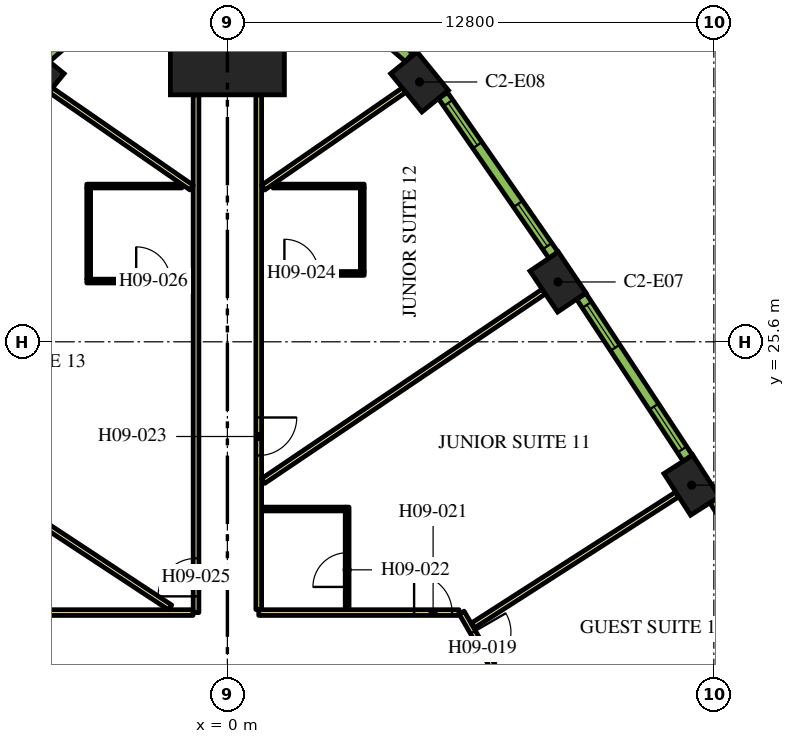
"""IFC4 building model, lengths in metres.
Left out: names, types, materials, properties, quantities, classifications, styles, units other than length and angle.
Written with IfcOpenShell. Run it as: python <this file> out.ifc"""

import sys

from ifc_helpers import new_model, si_unit, direction, frame, frame_2d, origin, origin_2d, place, context, subcontext, project, spatial, rectangle, extrude, element, fill, save


model = new_model("IFC4")
c1 = context("Model", 3, precision=1e-05, world=origin(), true_north=direction((0.0, 1.0)))
c2 = subcontext(c1, "Body", "Model", "MODEL_VIEW")
j1 = project(units=[si_unit("LENGTHUNIT", "METRE"), si_unit("PLANEANGLEUNIT", "RADIAN")], contexts=[c1])
p1 = place(None, origin())
s1 = spatial("IfcSite", under=j1, at=p1, CompositionType="ELEMENT")
p2 = place(p1, origin())
s2 = spatial("IfcBuilding", under=s1, at=p2, CompositionType="ELEMENT")
p3 = place(p2, frame((0.0, 0.0, 126.6)))
s3 = spatial("IfcBuildingStorey", under=s2, at=p3, CompositionType="ELEMENT", Elevation=126.6)
p4 = place(p3, frame((0.0, 33.598, 0.0), z_axis=(0.0, 0.0, 1.0), x_axis=(0.0, 1.0, 0.0)))
e1 = element("IfcColumn", 1, at=p4, inside=s3, PredefinedType="COLUMN", context=c2, shape_type="SweptSolid", body=[
    extrude(rectangle(XDim=3.0, YDim=3.0, at=origin_2d()), origin(), (0.0, 0.0, 1.0), 3.9),
])
for number, where, z_axis, x_axis in (
    (2, (12.217, 21.828, 0.0), (0.0, 0.0, 1.0), (-0.54, 0.842, 0.0)),
    (3, (8.699, 27.174, 0.0), (0.0, 0.0, 1.0), (-0.559, 0.829, 0.0)),
    (4, (5.056, 32.437, 0.0), (0.0, 0.0, 1.0), (-0.632, 0.775, 0.0)),
    (5, (-5.056, 32.437, 0.0), (0.0, 0.0, 1.0), (-0.632, -0.775, 0.0)),
):
    element("IfcColumn", number, at=place(p3, frame(where, z_axis=z_axis, x_axis=x_axis)), inside=s3, PredefinedType="COLUMN", context=c2, shape_type="SweptSolid", body=[
        extrude(rectangle(XDim=1.3, YDim=0.9, at=origin_2d()), origin(), (0.0, 0.0, 1.0), 3.9),
    ])
p5 = place(p3, frame((6.163, 18.475, 0.0), z_axis=(0.0, 0.0, 1.0), x_axis=(0.500001317485, -0.866024643133, 0.0)))
e6 = element("IfcWall", 6, at=p5, inside=s3, PredefinedType="PARTITIONING", context=c2, shape_type="SweptSolid", body=[
    extrude(rectangle(XDim=25.767, YDim=0.15, at=frame_2d((12.883, 0.0))), origin(), (0.0, 0.0, 1.0), 2.75),
])
p6 = place(p5, frame((19.306, 0.0, 0.0)))
e7 = element("IfcOpeningElement", 7, at=p6, cuts=e6, PredefinedType="OPENING", context=c2, shape_type="SweptSolid", body=[
    extrude(rectangle(XDim=1.0, YDim=2.1, at=frame_2d((0.5, 1.05))), frame((0.0, 0.085, 0.0), z_axis=(0.0, -1.0, 0.0), x_axis=(1.0, 0.0, 0.0)), (0.0, 0.0, 1.0), 0.17),
])
p7 = place(p5, frame((17.999, 0.0, 0.0)))
e8 = element("IfcOpeningElement", 8, at=p7, cuts=e6, PredefinedType="OPENING", context=c2, shape_type="SweptSolid", body=[
    extrude(rectangle(XDim=1.0, YDim=2.1, at=frame_2d((0.5, 1.05))), frame((0.0, 0.085, 0.0), z_axis=(0.0, -1.0, 0.0), x_axis=(1.0, 0.0, 0.0)), (0.0, 0.0, 1.0), 0.17),
])
p8 = place(p5, frame((0.596, 0.0, 0.0)))
e9 = element("IfcOpeningElement", 9, at=p8, cuts=e6, PredefinedType="OPENING", context=c2, shape_type="SweptSolid", body=[
    extrude(rectangle(XDim=1.0, YDim=2.1, at=frame_2d((0.5, 1.05))), frame((0.0, 0.085, 0.0), z_axis=(0.0, -1.0, 0.0), x_axis=(1.0, 0.0, 0.0)), (0.0, 0.0, 1.0), 0.17),
])
p9 = place(p3, frame((0.825, 18.475, 0.0), z_axis=(0.0, 0.0, 1.0), x_axis=(1.0, 0.0, 0.0)))
e10 = element("IfcWall", 10, at=p9, inside=s3, PredefinedType="PARTITIONING", context=c2, shape_type="SweptSolid", body=[
    extrude(rectangle(XDim=5.268, YDim=0.15, at=frame_2d((2.634, 0.0))), origin(), (0.0, 0.0, 1.0), 2.75),
])
p10 = place(p9, frame((4.088, 0.0, 0.0)))
e11 = element("IfcOpeningElement", 11, at=p10, cuts=e10, PredefinedType="OPENING", context=c2, shape_type="SweptSolid", body=[
    extrude(rectangle(XDim=1.0, YDim=2.1, at=frame_2d((0.5, 1.05))), frame((0.0, 0.085, 0.0), z_axis=(0.0, -1.0, 0.0), x_axis=(1.0, 0.0, 0.0)), (0.0, 0.0, 1.0), 0.17),
])
p11 = place(p3, frame((0.825, 32.098, 0.0), z_axis=(0.0, 0.0, 1.0), x_axis=(0.0, -1.0, 0.0)))
e12 = element("IfcWall", 12, at=p11, inside=s3, PredefinedType="PARTITIONING", context=c2, shape_type="SweptSolid", body=[
    extrude(rectangle(XDim=13.543, YDim=0.15, at=frame_2d((6.772, 0.0))), origin(), (0.0, 0.0, 1.0), 2.75),
])
p12 = place(p11, frame((8.49, 0.0, 0.0)))
e13 = element("IfcOpeningElement", 13, at=p12, cuts=e12, PredefinedType="OPENING", context=c2, shape_type="SweptSolid", body=[
    extrude(rectangle(XDim=1.0, YDim=2.1, at=frame_2d((0.5, 1.05))), frame((0.0, 0.085, 0.0), z_axis=(0.0, -1.0, 0.0), x_axis=(1.0, 0.0, 0.0)), (0.0, 0.0, 1.0), 0.17),
])
p13 = place(p3, frame((-0.825, 18.475, 0.0), z_axis=(0.0, 0.0, 1.0), x_axis=(0.0, 1.0, 0.0)))
e14 = element("IfcWall", 14, at=p13, inside=s3, PredefinedType="PARTITIONING", context=c2, shape_type="SweptSolid", body=[
    extrude(rectangle(XDim=13.623, YDim=0.15, at=frame_2d((6.812, 0.0))), origin(), (0.0, 0.0, 1.0), 2.75),
])
p14 = place(p13, frame((0.427, 0.0, 0.0)))
e15 = element("IfcOpeningElement", 15, at=p14, cuts=e14, PredefinedType="OPENING", context=c2, shape_type="SweptSolid", body=[
    extrude(rectangle(XDim=1.0, YDim=2.1, at=frame_2d((0.5, 1.05))), frame((0.0, 0.085, 0.0), z_axis=(0.0, -1.0, 0.0), x_axis=(1.0, 0.0, 0.0)), (0.0, 0.0, 1.0), 0.17),
])
p15 = place(p3, frame((-6.163, 18.475, 0.0), z_axis=(0.0, 0.0, 1.0), x_axis=(1.0, 0.0, 0.0)))
e16 = element("IfcWall", 16, at=p15, inside=s3, PredefinedType="PARTITIONING", context=c2, shape_type="SweptSolid", body=[
    extrude(rectangle(XDim=5.258, YDim=0.15, at=frame_2d((2.629, 0.0))), origin(), (0.0, 0.0, 1.0), 2.75),
])
p16 = place(p3, frame((-10.592, 24.589, 0.0), z_axis=(0.0, 0.0, 1.0), x_axis=(0.835337323748, -0.549737715236, 0.0)))
e17 = element("IfcWall", 17, at=p16, inside=s3, PredefinedType="PARTITIONING", context=c2, shape_type="SweptSolid", body=[
    extrude(rectangle(XDim=10.875, YDim=0.15, at=frame_2d((5.438, 0.0))), origin(), (0.0, 0.0, 1.0), 2.75),
])
p17 = place(p3, frame((-4.649, 32.223, 0.0), z_axis=(0.0, 0.0, 1.0), x_axis=(0.822262349475, -0.569108626394, 0.0)))
e18 = element("IfcWall", 18, at=p17, inside=s3, PredefinedType="PARTITIONING", context=c2, shape_type="SweptSolid", body=[
    extrude(rectangle(XDim=4.51, YDim=0.15, at=frame_2d((2.255, 0.0))), origin(), (0.0, 0.0, 1.0), 2.75),
])
p18 = place(p3, frame((8.326, 26.923, 0.0), z_axis=(0.0, 0.0, 1.0), x_axis=(-0.828836601893, -0.5594907393, 0.0)))
e19 = element("IfcWall", 19, at=p18, inside=s3, PredefinedType="PARTITIONING", context=c2, shape_type="SweptSolid", body=[
    extrude(rectangle(XDim=8.909, YDim=0.15, at=frame_2d((4.455, 0.0))), origin(), (0.0, 0.0, 1.0), 2.75),
])
p19 = place(p3, frame((4.649, 32.223, 0.0), z_axis=(0.0, 0.0, 1.0), x_axis=(-0.822262349475, -0.569108626394, 0.0)))
e20 = element("IfcWall", 20, at=p19, inside=s3, PredefinedType="PARTITIONING", context=c2, shape_type="SweptSolid", body=[
    extrude(rectangle(XDim=4.51, YDim=0.15, at=frame_2d((2.255, 0.0))), origin(), (0.0, 0.0, 1.0), 2.75),
])
p20 = place(p3, frame((11.838, 21.585, 0.0), z_axis=(0.0, 0.0, 1.0), x_axis=(-0.841699322813, -0.539946525108, 0.0)))
e21 = element("IfcWall", 21, at=p20, inside=s3, PredefinedType="PARTITIONING", context=c2, shape_type="SweptSolid", body=[
    extrude(rectangle(XDim=6.392, YDim=0.15, at=frame_2d((3.196, 0.0))), origin(), (0.0, 0.0, 1.0), 2.75),
])
p21 = place(p3, frame((3.151, 18.55, 0.0), z_axis=(0.0, 0.0, 1.0), x_axis=(0.0, 1.0, 0.0)))
e22 = element("IfcWall", 22, at=p21, inside=s3, PredefinedType="PARTITIONING", context=c2, shape_type="SweptSolid", body=[
    extrude(rectangle(XDim=2.7, YDim=0.1, at=frame_2d((1.35, 0.0))), origin(), (0.0, 0.0, 1.0), 2.75),
])
p22 = place(p21, frame((0.6, 0.0, 0.0)))
e23 = element("IfcOpeningElement", 23, at=p22, cuts=e22, PredefinedType="OPENING", context=c2, shape_type="SweptSolid", body=[
    extrude(rectangle(XDim=0.9, YDim=2.1, at=frame_2d((0.45, 1.05))), frame((0.0, 0.06, 0.0), z_axis=(0.0, -1.0, 0.0), x_axis=(1.0, 0.0, 0.0)), (0.0, 0.0, 1.0), 0.12),
])
p23 = place(p3, frame((3.101, 21.2, 0.0), z_axis=(0.0, 0.0, 1.0), x_axis=(-1.0, 0.0, 0.0)))
e24 = element("IfcWall", 24, at=p23, inside=s3, PredefinedType="PARTITIONING", context=c2, shape_type="SweptSolid", body=[
    extrude(rectangle(XDim=2.2, YDim=0.1, at=frame_2d((1.1, 0.0))), origin(), (0.0, 0.0, 1.0), 2.75),
])
p24 = place(p3, frame((0.9, 27.398, 0.0), z_axis=(0.0, 0.0, 1.0), x_axis=(1.0, 0.0, 0.0)))
e25 = element("IfcWall", 25, at=p24, inside=s3, PredefinedType="PARTITIONING", context=c2, shape_type="SweptSolid", body=[
    extrude(rectangle(XDim=2.7, YDim=0.1, at=frame_2d((1.35, 0.0))), origin(), (0.0, 0.0, 1.0), 2.75),
])
p25 = place(p24, frame((0.6, 0.0, 0.0)))
e26 = element("IfcOpeningElement", 26, at=p25, cuts=e25, PredefinedType="OPENING", context=c2, shape_type="SweptSolid", body=[
    extrude(rectangle(XDim=0.9, YDim=2.1, at=frame_2d((0.45, 1.05))), frame((0.0, 0.06, 0.0), z_axis=(0.0, -1.0, 0.0), x_axis=(1.0, 0.0, 0.0)), (0.0, 0.0, 1.0), 0.12),
])
p26 = place(p3, frame((3.55, 27.448, 0.0), z_axis=(0.0, 0.0, 1.0), x_axis=(0.0, 1.0, 0.0)))
e27 = element("IfcWall", 27, at=p26, inside=s3, PredefinedType="PARTITIONING", context=c2, shape_type="SweptSolid", body=[
    extrude(rectangle(XDim=2.2, YDim=0.1, at=frame_2d((1.1, 0.0))), origin(), (0.0, 0.0, 1.0), 2.75),
])
p27 = place(p3, frame((1.2, 29.698, 0.0), z_axis=(0.0, 0.0, 1.0), x_axis=(1.0, 0.0, 0.0)))
e28 = element("IfcWall", 28, at=p27, inside=s3, PredefinedType="PARTITIONING", context=c2, shape_type="SweptSolid", body=[
    extrude(rectangle(XDim=2.4, YDim=0.1, at=frame_2d((1.2, 0.0))), origin(), (0.0, 0.0, 1.0), 2.75),
])
p28 = place(p3, frame((-3.7, 27.198, 0.0), z_axis=(0.0, 0.0, 1.0), x_axis=(1.0, 0.0, 0.0)))
e29 = element("IfcWall", 29, at=p28, inside=s3, PredefinedType="PARTITIONING", context=c2, shape_type="SweptSolid", body=[
    extrude(rectangle(XDim=2.8, YDim=0.1, at=frame_2d((1.4, 0.0))), origin(), (0.0, 0.0, 1.0), 2.75),
])
p29 = place(p28, frame((1.3, 0.0, 0.0)))
e30 = element("IfcOpeningElement", 30, at=p29, cuts=e29, PredefinedType="OPENING", context=c2, shape_type="SweptSolid", body=[
    extrude(rectangle(XDim=0.9, YDim=2.1, at=frame_2d((0.45, 1.05))), frame((0.0, 0.06, 0.0), z_axis=(0.0, -1.0, 0.0), x_axis=(1.0, 0.0, 0.0)), (0.0, 0.0, 1.0), 0.12),
])
p30 = place(p3, frame((-3.65, 27.248, 0.0), z_axis=(0.0, 0.0, 1.0), x_axis=(0.0, 1.0, 0.0)))
e31 = element("IfcWall", 31, at=p30, inside=s3, PredefinedType="PARTITIONING", context=c2, shape_type="SweptSolid", body=[
    extrude(rectangle(XDim=2.4, YDim=0.1, at=frame_2d((1.2, 0.0))), origin(), (0.0, 0.0, 1.0), 2.75),
])
p31 = place(p3, frame((-1.2, 29.698, 0.0), z_axis=(0.0, 0.0, 1.0), x_axis=(-1.0, 0.0, 0.0)))
e32 = element("IfcWall", 32, at=p31, inside=s3, PredefinedType="PARTITIONING", context=c2, shape_type="SweptSolid", body=[
    extrude(rectangle(XDim=2.5, YDim=0.1, at=frame_2d((1.25, 0.0))), origin(), (0.0, 0.0, 1.0), 2.75),
])
p32 = place(p3, frame((15.524, 17.114, 0.0), z_axis=(0.0, 0.0, 1.0), x_axis=(-0.530072082134, 0.847952585787, 0.0)))
e33 = element("IfcWall", 33, at=p32, inside=s3, PredefinedType="SOLIDWALL", context=c2, shape_type="SweptSolid", body=[
    extrude(rectangle(XDim=5.1, YDim=0.29, at=frame_2d((2.55, 0.0))), origin(), (0.0, 0.0, 1.0), 3.65),
])
p33 = place(p32, frame((0.273, 0.0, 0.9)))
e34 = element("IfcOpeningElement", 34, at=p33, cuts=e33, PredefinedType="OPENING", context=c2, shape_type="SweptSolid", body=[
    extrude(rectangle(XDim=1.35, YDim=2.15, at=frame_2d((0.675, 1.075))), frame((0.0, 0.155, 0.0), z_axis=(0.0, -1.0, 0.0), x_axis=(1.0, 0.0, 0.0)), (0.0, 0.0, 1.0), 0.31),
])
p34 = place(p32, frame((3.478, 0.0, 0.9)))
e35 = element("IfcOpeningElement", 35, at=p34, cuts=e33, PredefinedType="OPENING", context=c2, shape_type="SweptSolid", body=[
    extrude(rectangle(XDim=1.35, YDim=2.15, at=frame_2d((0.675, 1.075))), frame((0.0, 0.155, 0.0), z_axis=(0.0, -1.0, 0.0), x_axis=(1.0, 0.0, 0.0)), (0.0, 0.0, 1.0), 0.31),
])
p35 = place(p3, frame((12.115, 22.539, 0.0), z_axis=(0.0, 0.0, 1.0), x_axis=(-0.549741341923, 0.835334937005, 0.0)))
e36 = element("IfcWall", 36, at=p35, inside=s3, PredefinedType="SOLIDWALL", context=c2, shape_type="SweptSolid", body=[
    extrude(rectangle(XDim=5.1, YDim=0.29, at=frame_2d((2.55, 0.0))), origin(), (0.0, 0.0, 1.0), 3.65),
])
p36 = place(p35, frame((0.273, 0.0, 0.9)))
e37 = element("IfcOpeningElement", 37, at=p36, cuts=e36, PredefinedType="OPENING", context=c2, shape_type="SweptSolid", body=[
    extrude(rectangle(XDim=1.35, YDim=2.15, at=frame_2d((0.675, 1.075))), frame((0.0, 0.155, 0.0), z_axis=(0.0, -1.0, 0.0), x_axis=(1.0, 0.0, 0.0)), (0.0, 0.0, 1.0), 0.31),
])
p37 = place(p35, frame((3.478, 0.0, 0.9)))
e38 = element("IfcOpeningElement", 38, at=p37, cuts=e36, PredefinedType="OPENING", context=c2, shape_type="SweptSolid", body=[
    extrude(rectangle(XDim=1.35, YDim=2.15, at=frame_2d((0.675, 1.075))), frame((0.0, 0.155, 0.0), z_axis=(0.0, -1.0, 0.0), x_axis=(1.0, 0.0, 0.0)), (0.0, 0.0, 1.0), 0.31),
])
p38 = place(p3, frame((8.58, 27.882, 0.0), z_axis=(0.0, 0.0, 1.0), x_axis=(-0.569113019126, 0.822259309136, 0.0)))
e39 = element("IfcWall", 39, at=p38, inside=s3, PredefinedType="SOLIDWALL", context=c2, shape_type="SweptSolid", body=[
    extrude(rectangle(XDim=5.107, YDim=0.29, at=frame_2d((2.553, 0.0))), origin(), (0.0, 0.0, 1.0), 3.65),
])
p39 = place(p38, frame((0.285, 0.0, 0.9)))
e40 = element("IfcOpeningElement", 40, at=p39, cuts=e39, PredefinedType="OPENING", context=c2, shape_type="SweptSolid", body=[
    extrude(rectangle(XDim=1.35, YDim=2.15, at=frame_2d((0.675, 1.075))), frame((0.0, 0.155, 0.0), z_axis=(0.0, -1.0, 0.0), x_axis=(1.0, 0.0, 0.0)), (0.0, 0.0, 1.0), 0.31),
])
p40 = place(p38, frame((3.516, 0.0, 0.9)))
e41 = element("IfcOpeningElement", 41, at=p40, cuts=e39, PredefinedType="OPENING", context=c2, shape_type="SweptSolid", body=[
    extrude(rectangle(XDim=1.35, YDim=2.15, at=frame_2d((0.675, 1.075))), frame((0.0, 0.155, 0.0), z_axis=(0.0, -1.0, 0.0), x_axis=(1.0, 0.0, 0.0)), (0.0, 0.0, 1.0), 0.31),
])
p41 = place(p3, frame((4.778, 33.082, 0.0), z_axis=(0.0, 0.0, 1.0), x_axis=(-0.754882764627, 0.655859749999, 0.0)))
e42 = element("IfcWall", 42, at=p41, inside=s3, PredefinedType="SOLIDWALL", context=c2, shape_type="SweptSolid", body=[
    extrude(rectangle(XDim=1.82, YDim=0.29, at=frame_2d((0.91, 0.0))), origin(), (0.0, 0.0, 1.0), 3.65),
])
p42 = place(p41, frame((0.46, 0.0, 0.9)))
e43 = element("IfcOpeningElement", 43, at=p42, cuts=e42, PredefinedType="OPENING", context=c2, shape_type="SweptSolid", body=[
    extrude(rectangle(XDim=0.9, YDim=2.15, at=frame_2d((0.45, 1.075))), frame((0.0, 0.155, 0.0), z_axis=(0.0, -1.0, 0.0), x_axis=(1.0, 0.0, 0.0)), (0.0, 0.0, 1.0), 0.31),
])
p43 = place(p3, frame((-3.405, 34.275, 0.0), z_axis=(0.0, 0.0, 1.0), x_axis=(-0.754882764627, -0.655859749999, 0.0)))
e44 = element("IfcWall", 44, at=p43, inside=s3, PredefinedType="SOLIDWALL", context=c2, shape_type="SweptSolid", body=[
    extrude(rectangle(XDim=1.82, YDim=0.29, at=frame_2d((0.91, 0.0))), origin(), (0.0, 0.0, 1.0), 3.65),
])
p44 = place(p43, frame((0.46, 0.0, 0.9)))
e45 = element("IfcOpeningElement", 45, at=p44, cuts=e44, PredefinedType="OPENING", context=c2, shape_type="SweptSolid", body=[
    extrude(rectangle(XDim=0.9, YDim=2.15, at=frame_2d((0.45, 1.075))), frame((0.0, 0.155, 0.0), z_axis=(0.0, -1.0, 0.0), x_axis=(1.0, 0.0, 0.0)), (0.0, 0.0, 1.0), 0.31),
])
p45 = place(p8, origin())
e46 = element("IfcDoor", 46, at=p45, inside=s3, OperationType="SINGLE_SWING_LEFT", PredefinedType="DOOR", context=c2, shape_type="SweptSolid", body=[
    extrude(rectangle(XDim=1.0, YDim=2.1, at=frame_2d((0.5, 1.05))), frame((0.0, 0.025, 0.0), z_axis=(0.0, -1.0, 0.0), x_axis=(1.0, 0.0, 0.0)), (0.0, 0.0, 1.0), 0.05),
])
fill(e9, e46)
p46 = place(p10, origin())
e47 = element("IfcDoor", 47, at=p46, inside=s3, OperationType="SINGLE_SWING_RIGHT", PredefinedType="DOOR", context=c2, shape_type="SweptSolid", body=[
    extrude(rectangle(XDim=1.0, YDim=2.1, at=frame_2d((0.5, 1.05))), frame((0.0, 0.025, 0.0), z_axis=(0.0, -1.0, 0.0), x_axis=(1.0, 0.0, 0.0)), (0.0, 0.0, 1.0), 0.05),
])
fill(e11, e47)
p47 = place(p22, origin())
e48 = element("IfcDoor", 48, at=p47, inside=s3, OperationType="SINGLE_SWING_LEFT", PredefinedType="DOOR", context=c2, shape_type="SweptSolid", body=[
    extrude(rectangle(XDim=0.9, YDim=2.1, at=frame_2d((0.45, 1.05))), frame((0.0, 0.025, 0.0), z_axis=(0.0, -1.0, 0.0), x_axis=(1.0, 0.0, 0.0)), (0.0, 0.0, 1.0), 0.05),
])
fill(e23, e48)
p48 = place(p12, origin())
e49 = element("IfcDoor", 49, at=p48, inside=s3, OperationType="SINGLE_SWING_RIGHT", PredefinedType="DOOR", context=c2, shape_type="SweptSolid", body=[
    extrude(rectangle(XDim=1.0, YDim=2.1, at=frame_2d((0.5, 1.05))), frame((0.0, 0.025, 0.0), z_axis=(0.0, -1.0, 0.0), x_axis=(1.0, 0.0, 0.0)), (0.0, 0.0, 1.0), 0.05),
])
fill(e13, e49)
p49 = place(p25, origin())
e50 = element("IfcDoor", 50, at=p49, inside=s3, OperationType="SINGLE_SWING_RIGHT", PredefinedType="DOOR", context=c2, shape_type="SweptSolid", body=[
    extrude(rectangle(XDim=0.9, YDim=2.1, at=frame_2d((0.45, 1.05))), frame((0.0, 0.025, 0.0), z_axis=(0.0, -1.0, 0.0), x_axis=(1.0, 0.0, 0.0)), (0.0, 0.0, 1.0), 0.05),
])
fill(e26, e50)
p50 = place(p14, origin())
e51 = element("IfcDoor", 51, at=p50, inside=s3, OperationType="SINGLE_SWING_LEFT", PredefinedType="DOOR", context=c2, shape_type="SweptSolid", body=[
    extrude(rectangle(XDim=1.0, YDim=2.1, at=frame_2d((0.5, 1.05))), frame((0.0, 0.025, 0.0), z_axis=(0.0, -1.0, 0.0), x_axis=(1.0, 0.0, 0.0)), (0.0, 0.0, 1.0), 0.05),
])
fill(e15, e51)
p51 = place(p29, origin())
e52 = element("IfcDoor", 52, at=p51, inside=s3, OperationType="SINGLE_SWING_LEFT", PredefinedType="DOOR", context=c2, shape_type="SweptSolid", body=[
    extrude(rectangle(XDim=0.9, YDim=2.1, at=frame_2d((0.45, 1.05))), frame((0.0, 0.025, 0.0), z_axis=(0.0, -1.0, 0.0), x_axis=(1.0, 0.0, 0.0)), (0.0, 0.0, 1.0), 0.05),
])
fill(e30, e52)
p52 = place(p36, origin())
e53 = element("IfcWindow", 53, at=p52, inside=s3, PartitioningType="DOUBLE_PANEL_VERTICAL", PredefinedType="WINDOW", context=c2, shape_type="SweptSolid", body=[
    extrude(rectangle(XDim=1.35, YDim=2.15, at=frame_2d((0.675, 1.075))), frame((0.0, 0.015, 0.0), z_axis=(0.0, -1.0, 0.0), x_axis=(1.0, 0.0, 0.0)), (0.0, 0.0, 1.0), 0.06),
])
fill(e37, e53)
p53 = place(p37, origin())
e54 = element("IfcWindow", 54, at=p53, inside=s3, PartitioningType="DOUBLE_PANEL_VERTICAL", PredefinedType="WINDOW", context=c2, shape_type="SweptSolid", body=[
    extrude(rectangle(XDim=1.35, YDim=2.15, at=frame_2d((0.675, 1.075))), frame((0.0, 0.015, 0.0), z_axis=(0.0, -1.0, 0.0), x_axis=(1.0, 0.0, 0.0)), (0.0, 0.0, 1.0), 0.06),
])
fill(e38, e54)
p54 = place(p39, origin())
e55 = element("IfcWindow", 55, at=p54, inside=s3, PartitioningType="DOUBLE_PANEL_VERTICAL", PredefinedType="WINDOW", context=c2, shape_type="SweptSolid", body=[
    extrude(rectangle(XDim=1.35, YDim=2.15, at=frame_2d((0.675, 1.075))), frame((0.0, 0.015, 0.0), z_axis=(0.0, -1.0, 0.0), x_axis=(1.0, 0.0, 0.0)), (0.0, 0.0, 1.0), 0.06),
])
fill(e40, e55)
p55 = place(p40, origin())
e56 = element("IfcWindow", 56, at=p55, inside=s3, PartitioningType="DOUBLE_PANEL_VERTICAL", PredefinedType="WINDOW", context=c2, shape_type="SweptSolid", body=[
    extrude(rectangle(XDim=1.35, YDim=2.15, at=frame_2d((0.675, 1.075))), frame((0.0, 0.015, 0.0), z_axis=(0.0, -1.0, 0.0), x_axis=(1.0, 0.0, 0.0)), (0.0, 0.0, 1.0), 0.06),
])
fill(e41, e56)
save(model, sys.argv[1])
